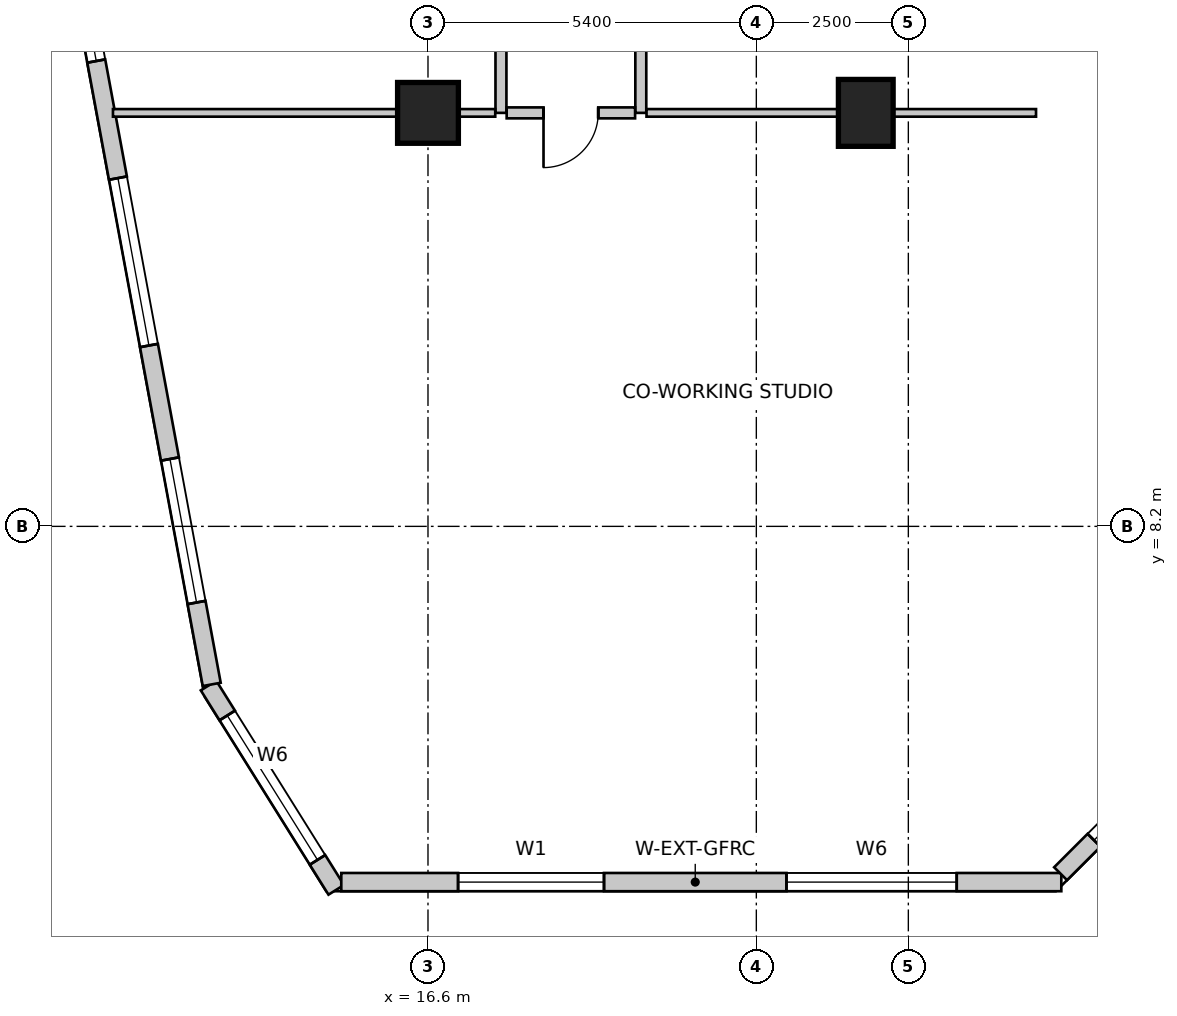
"""IFC4 building model, lengths in metres.
Left out: names, types, materials, properties, quantities, classifications, styles, units other than length and angle.
Written with IfcOpenShell. Run it as: python <this file> out.ifc"""

import sys

from ifc_helpers import new_model, si_unit, direction, frame, frame_2d, origin, origin_2d, place, context, subcontext, project, spatial, rectangle, extrude, source, transform, mapped, element, fill, save


model = new_model("IFC4")
c1 = context("Model", 3, precision=1e-05, world=origin(), true_north=direction((0.0, 1.0)))
c2 = subcontext(c1, "Body", "Model", "MODEL_VIEW")
j1 = project(units=[si_unit("LENGTHUNIT", "METRE"), si_unit("PLANEANGLEUNIT", "RADIAN")], contexts=[c1])
p1 = place(None, origin())
s1 = spatial("IfcSite", under=j1, at=p1, CompositionType="ELEMENT")
p2 = place(p1, origin())
s2 = spatial("IfcBuilding", under=s1, at=p2, CompositionType="ELEMENT")
p3 = place(p2, frame((0.0, 0.0, 55.0)))
s3 = spatial("IfcBuildingStorey", under=s2, at=p3, CompositionType="ELEMENT", Elevation=55.0)
m1 = source(origin(), c2, "Body", "SweptSolid", [
    extrude(rectangle(XDim=0.9, YDim=1.1, at=origin_2d()), origin(), (0.0, 0.0, 1.0), 4.0),
])
p4 = place(p3, frame((23.8, 15.0, 0.0), z_axis=(0.0, 0.0, 1.0), x_axis=(1.0, 0.0, 0.0)))
e1 = element("IfcColumn", 1, at=p4, inside=s3, PredefinedType="COLUMN", context=c2, shape_type="MappedRepresentation", body=[
    mapped(m1, transform((0.0, 0.0, 0.0), scale=1.0)),
])
m2 = source(origin(), c2, "Body", "SweptSolid", [
    extrude(rectangle(XDim=1.0, YDim=1.0, at=origin_2d()), origin(), (0.0, 0.0, 1.0), 4.0),
])
p5 = place(p3, frame((16.6, 15.0, 0.0), z_axis=(0.0, 0.0, 1.0), x_axis=(1.0, 0.0, 0.0)))
e2 = element("IfcColumn", 2, at=p5, inside=s3, PredefinedType="COLUMN", context=c2, shape_type="MappedRepresentation", body=[
    mapped(m2, transform((0.0, 0.0, 0.0), scale=1.0)),
])
p6 = place(p3, frame((12.991, 5.583, 0.0), z_axis=(0.0, 0.0, 1.0), x_axis=(0.530015557218, -0.847987918019, 0.0)))
e3 = element("IfcWall", 3, at=p6, inside=s3, PredefinedType="SOLIDWALL", context=c2, shape_type="SweptSolid", body=[
    extrude(rectangle(XDim=3.962, YDim=0.3, at=frame_2d((1.981, 0.0))), origin(), (0.0, 0.0, 1.0), 3.75),
])
m3 = source(origin(), c2, "Body", "SweptSolid", [
    extrude(rectangle(XDim=2.8, YDim=2.4, at=frame_2d((1.4, 1.2))), frame((0.0, 0.16, 0.0), z_axis=(0.0, -1.0, 0.0), x_axis=(1.0, 0.0, 0.0)), (0.0, 0.0, 1.0), 0.32),
])
p7 = place(p6, frame((0.581, 0.0, 0.85)))
e4 = element("IfcOpeningElement", 4, at=p7, cuts=e3, PredefinedType="OPENING", context=c2, shape_type="MappedRepresentation", body=[
    mapped(m3, transform((0.0, 0.0, 0.0), scale=1.0)),
])
p8 = place(p3, frame((15.174, 2.35, 0.0), z_axis=(0.0, 0.0, 1.0), x_axis=(1.0, 0.0, 0.0)))
e5 = element("IfcWall", 5, at=p8, inside=s3, PredefinedType="SOLIDWALL", context=c2, shape_type="SweptSolid", body=[
    extrude(rectangle(XDim=11.842, YDim=0.3, at=frame_2d((5.921, 0.0))), origin(), (0.0, 0.0, 1.0), 3.75),
])
m4 = source(origin(), c2, "Body", "SweptSolid", [
    extrude(rectangle(XDim=2.4, YDim=2.2, at=frame_2d((1.2, 1.1))), frame((0.0, 0.16, 0.0), z_axis=(0.0, -1.0, 0.0), x_axis=(1.0, 0.0, 0.0)), (0.0, 0.0, 1.0), 0.32),
])
p9 = place(p8, frame((1.921, 0.0, 0.85)))
e6 = element("IfcOpeningElement", 6, at=p9, cuts=e5, PredefinedType="OPENING", context=c2, shape_type="MappedRepresentation", body=[
    mapped(m4, transform((0.0, 0.0, 0.0), scale=1.0)),
])
p10 = place(p8, frame((7.322, 0.0, 0.85)))
e7 = element("IfcOpeningElement", 7, at=p10, cuts=e5, PredefinedType="OPENING", context=c2, shape_type="MappedRepresentation", body=[
    mapped(m3, transform((0.0, 0.0, 0.0), scale=1.0)),
])
p11 = place(p3, frame((27.004, 2.488, 0.0), z_axis=(0.0, 0.0, 1.0), x_axis=(0.707106781187, 0.707106781187, 0.0)))
e8 = element("IfcWall", 8, at=p11, inside=s3, PredefinedType="SOLIDWALL", context=c2, shape_type="SweptSolid", body=[
    extrude(rectangle(XDim=4.356, YDim=0.3, at=frame_2d((2.178, 0.0))), origin(), (0.0, 0.0, 1.0), 3.75),
])
p12 = place(p11, frame((0.778, 0.0, 0.85)))
e9 = element("IfcOpeningElement", 9, at=p12, cuts=e8, PredefinedType="OPENING", context=c2, shape_type="MappedRepresentation", body=[
    mapped(m3, transform((0.0, 0.0, 0.0), scale=1.0)),
])
p13 = place(p3, frame((8.183, 31.833, 0.0), z_axis=(0.0, 0.0, 1.0), x_axis=(0.18216364648, -0.983268226834, 0.0)))
e10 = element("IfcWall", 10, at=p13, inside=s3, PredefinedType="SOLIDWALL", context=c2, shape_type="SweptSolid", body=[
    extrude(rectangle(XDim=26.678, YDim=0.3, at=frame_2d((13.339, 0.0))), origin(), (0.0, 0.0, 1.0), 3.75),
])
m5 = source(origin(), c2, "Body", "SweptSolid", [
    extrude(rectangle(XDim=2.1, YDim=2.0, at=frame_2d((1.05, 1.0))), frame((0.0, 0.16, 0.0), z_axis=(0.0, -1.0, 0.0), x_axis=(1.0, 0.0, 0.0)), (0.0, 0.0, 1.0), 0.32),
])
p14 = place(p13, frame((1.014, 0.0, 0.85)))
e11 = element("IfcOpeningElement", 11, at=p14, cuts=e10, PredefinedType="OPENING", context=c2, shape_type="MappedRepresentation", body=[
    mapped(m5, transform((0.0, 0.0, 0.0), scale=1.0)),
])
p15 = place(p13, frame((4.3, 0.0, 0.85)))
e12 = element("IfcOpeningElement", 12, at=p15, cuts=e10, PredefinedType="OPENING", context=c2, shape_type="MappedRepresentation", body=[
    mapped(m3, transform((0.0, 0.0, 0.0), scale=1.0)),
])
p16 = place(p13, frame((8.876, 0.0, 0.85)))
e13 = element("IfcOpeningElement", 13, at=p16, cuts=e10, PredefinedType="OPENING", context=c2, shape_type="MappedRepresentation", body=[
    mapped(m3, transform((0.0, 0.0, 0.0), scale=1.0)),
])
p17 = place(p13, frame((13.453, 0.0, 0.85)))
e14 = element("IfcOpeningElement", 14, at=p17, cuts=e10, PredefinedType="OPENING", context=c2, shape_type="MappedRepresentation", body=[
    mapped(m3, transform((0.0, 0.0, 0.0), scale=1.0)),
])
p18 = place(p13, frame((18.211, 0.0, 0.85)))
e15 = element("IfcOpeningElement", 15, at=p18, cuts=e10, PredefinedType="OPENING", context=c2, shape_type="MappedRepresentation", body=[
    mapped(m3, transform((0.0, 0.0, 0.0), scale=1.0)),
])
p19 = place(p13, frame((22.909, 0.0, 0.85)))
e16 = element("IfcOpeningElement", 16, at=p19, cuts=e10, PredefinedType="OPENING", context=c2, shape_type="MappedRepresentation", body=[
    mapped(m4, transform((0.0, 0.0, 0.0), scale=1.0)),
])
p20 = place(p3, frame((17.8, 15.0, 0.0), z_axis=(0.0, 0.0, 1.0), x_axis=(0.0, 1.0, 0.0)))
e17 = element("IfcWall", 17, at=p20, inside=s3, PredefinedType="PARTITIONING", context=c2, shape_type="SweptSolid", body=[
    extrude(rectangle(XDim=4.66, YDim=0.18, at=frame_2d((2.33, 0.0))), origin(), (0.0, 0.0, 1.0), 2.892),
])
m6 = source(origin(), c2, "Body", "SweptSolid", [
    extrude(rectangle(XDim=0.9, YDim=2.15, at=frame_2d((0.45, 1.075))), frame((0.0, 0.1, 0.0), z_axis=(0.0, -1.0, 0.0), x_axis=(1.0, 0.0, 0.0)), (0.0, 0.0, 1.0), 0.2),
])
p21 = place(p20, frame((1.88, 0.0, 0.0)))
e18 = element("IfcOpeningElement", 18, at=p21, cuts=e17, PredefinedType="OPENING", context=c2, shape_type="MappedRepresentation", body=[
    mapped(m6, transform((0.0, 0.0, 0.0), scale=1.0)),
])
p22 = place(p3, frame((20.1, 19.66, 0.0), z_axis=(0.0, 0.0, 1.0), x_axis=(0.0, -1.0, 0.0)))
e19 = element("IfcWall", 19, at=p22, inside=s3, PredefinedType="PARTITIONING", context=c2, shape_type="SweptSolid", body=[
    extrude(rectangle(XDim=4.66, YDim=0.18, at=frame_2d((2.33, 0.0))), origin(), (0.0, 0.0, 1.0), 2.892),
])
p23 = place(p22, frame((1.88, 0.0, 0.0)))
e20 = element("IfcOpeningElement", 20, at=p23, cuts=e19, PredefinedType="OPENING", context=c2, shape_type="MappedRepresentation", body=[
    mapped(m6, transform((0.0, 0.0, 0.0), scale=1.0)),
])
p24 = place(p3, frame((20.006, 15.0, 0.0), z_axis=(0.0, 0.0, 1.0), x_axis=(-1.0, 0.0, 0.0)))
e21 = element("IfcWall", 21, at=p24, inside=s3, PredefinedType="PARTITIONING", context=c2, shape_type="SweptSolid", body=[
    extrude(rectangle(XDim=2.112, YDim=0.18, at=frame_2d((1.056, 0.0))), origin(), (0.0, 0.0, 1.0), 2.892),
])
p25 = place(p24, frame((0.606, 0.0, 0.0)))
e22 = element("IfcOpeningElement", 22, at=p25, cuts=e21, PredefinedType="OPENING", context=c2, shape_type="MappedRepresentation", body=[
    mapped(m6, transform((0.0, 0.0, 0.0), scale=1.0)),
])
p26 = place(p3, frame((17.706, 15.0, 0.0), z_axis=(0.0, 0.0, 1.0), x_axis=(-1.0, 0.0, 0.0)))
e23 = element("IfcWall", 23, at=p26, inside=s3, PredefinedType="PARTITIONING", context=c2, shape_type="SweptSolid", body=[
    extrude(rectangle(XDim=6.287, YDim=0.125, at=frame_2d((3.144, 0.0))), origin(), (0.0, 0.0, 1.0), 2.892),
])
p27 = place(p3, frame((26.6, 15.0, 0.0), z_axis=(0.0, 0.0, 1.0), x_axis=(-1.0, 0.0, 0.0)))
e24 = element("IfcWall", 24, at=p27, inside=s3, PredefinedType="PARTITIONING", context=c2, shape_type="SweptSolid", body=[
    extrude(rectangle(XDim=6.406, YDim=0.125, at=frame_2d((3.203, 0.0))), origin(), (0.0, 0.0, 1.0), 2.892),
])
m7 = source(origin(), c2, "Body", "SweptSolid", [
    extrude(rectangle(XDim=2.8, YDim=2.4, at=frame_2d((1.4, 1.2))), frame((0.0, -0.015, 0.0), z_axis=(0.0, -1.0, 0.0), x_axis=(1.0, 0.0, 0.0)), (0.0, 0.0, 1.0), 0.06),
])
p28 = place(p7, origin())
e25 = element("IfcWindow", 25, at=p28, inside=s3, PartitioningType="SINGLE_PANEL", PredefinedType="WINDOW", context=c2, shape_type="MappedRepresentation", body=[
    mapped(m7, transform((0.0, 0.0, 0.0), scale=1.0)),
])
fill(e4, e25)
m8 = source(origin(), c2, "Body", "SweptSolid", [
    extrude(rectangle(XDim=2.4, YDim=2.2, at=frame_2d((1.2, 1.1))), frame((0.0, -0.015, 0.0), z_axis=(0.0, -1.0, 0.0), x_axis=(1.0, 0.0, 0.0)), (0.0, 0.0, 1.0), 0.06),
])
p29 = place(p9, origin())
e26 = element("IfcWindow", 26, at=p29, inside=s3, PartitioningType="SINGLE_PANEL", PredefinedType="WINDOW", context=c2, shape_type="MappedRepresentation", body=[
    mapped(m8, transform((0.0, 0.0, 0.0), scale=1.0)),
])
fill(e6, e26)
p30 = place(p10, origin())
e27 = element("IfcWindow", 27, at=p30, inside=s3, PartitioningType="SINGLE_PANEL", PredefinedType="WINDOW", context=c2, shape_type="MappedRepresentation", body=[
    mapped(m7, transform((0.0, 0.0, 0.0), scale=1.0)),
])
fill(e7, e27)
p31 = place(p12, origin())
e28 = element("IfcWindow", 28, at=p31, inside=s3, PartitioningType="SINGLE_PANEL", PredefinedType="WINDOW", context=c2, shape_type="MappedRepresentation", body=[
    mapped(m7, transform((0.0, 0.0, 0.0), scale=1.0)),
])
fill(e9, e28)
p32 = place(p17, origin())
e29 = element("IfcWindow", 29, at=p32, inside=s3, PartitioningType="SINGLE_PANEL", PredefinedType="WINDOW", context=c2, shape_type="MappedRepresentation", body=[
    mapped(m7, transform((0.0, 0.0, 0.0), scale=1.0)),
])
fill(e14, e29)
p33 = place(p18, origin())
e30 = element("IfcWindow", 30, at=p33, inside=s3, PartitioningType="SINGLE_PANEL", PredefinedType="WINDOW", context=c2, shape_type="MappedRepresentation", body=[
    mapped(m7, transform((0.0, 0.0, 0.0), scale=1.0)),
])
fill(e15, e30)
p34 = place(p19, origin())
e31 = element("IfcWindow", 31, at=p34, inside=s3, PartitioningType="SINGLE_PANEL", PredefinedType="WINDOW", context=c2, shape_type="MappedRepresentation", body=[
    mapped(m8, transform((0.0, 0.0, 0.0), scale=1.0)),
])
fill(e16, e31)
m9 = source(origin(), c2, "Body", "SweptSolid", [
    extrude(rectangle(XDim=0.9, YDim=2.15, at=frame_2d((0.45, 1.075))), frame((0.0, 0.025, 0.0), z_axis=(0.0, -1.0, 0.0), x_axis=(1.0, 0.0, 0.0)), (0.0, 0.0, 1.0), 0.05),
])
p35 = place(p25, origin())
e32 = element("IfcDoor", 32, at=p35, inside=s3, OperationType="SINGLE_SWING_RIGHT", PredefinedType="DOOR", context=c2, shape_type="MappedRepresentation", body=[
    mapped(m9, transform((0.0, 0.0, 0.0), scale=1.0)),
])
fill(e22, e32)
save(model, sys.argv[1])
